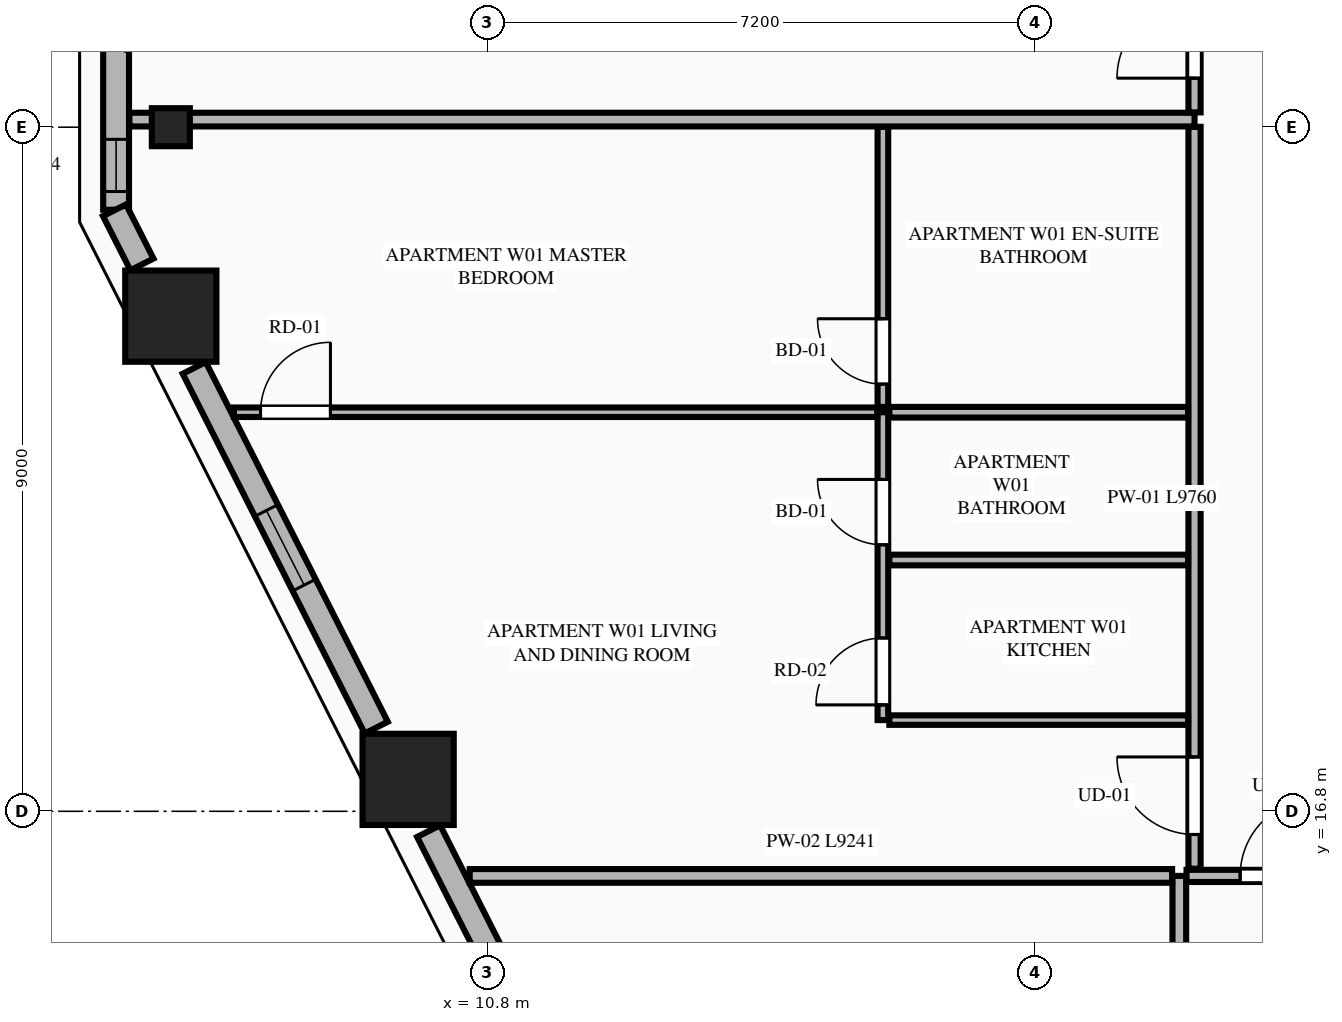
"""IFC4 building model, lengths in metres.
Left out: names, types, materials, properties, quantities, classifications, styles, units other than length and angle.
Written with IfcOpenShell. Run it as: python <this file> out.ifc"""

import sys

from ifc_helpers import new_model, si_unit, direction, frame, frame_2d, origin, origin_2d, place, context, subcontext, project, spatial, rectangle, extrude, element, fill, save


model = new_model("IFC4")
c1 = context("Model", 3, precision=1e-05, world=origin(), true_north=direction((0.0, 1.0)))
c2 = subcontext(c1, "Body", "Model", "MODEL_VIEW")
j1 = project(units=[si_unit("LENGTHUNIT", "METRE"), si_unit("PLANEANGLEUNIT", "RADIAN")], contexts=[c1])
p1 = place(None, origin())
s1 = spatial("IfcSite", under=j1, at=p1, CompositionType="ELEMENT")
p2 = place(p1, origin())
s2 = spatial("IfcBuilding", under=s1, at=p2, CompositionType="ELEMENT")
p3 = place(p2, frame((0.0, 0.0, 32.0)))
s3 = spatial("IfcBuildingStorey", under=s2, at=p3, CompositionType="ELEMENT", Elevation=32.0)
for number, where, z_axis, x_axis in (
    (1, (6.632, 23.314, 0.0), (0.0, 0.0, 1.0), (1.0, 0.0, 0.0)),
    (2, (9.754, 17.22, 0.0), (0.0, 0.0, 1.0), (1.0, 0.0, 0.0)),
):
    element("IfcColumn", number, at=place(p3, frame(where, z_axis=z_axis, x_axis=x_axis)), inside=s3, PredefinedType="COLUMN", context=c2, shape_type="SweptSolid", body=[
        extrude(rectangle(XDim=1.2, YDim=1.2, at=origin_2d()), origin(), (0.0, 0.0, 1.0), 3.55),
    ])
p4 = place(p3, frame((6.632, 25.8, 0.0), z_axis=(0.0, 0.0, 1.0), x_axis=(0.0, -1.0, 0.0)))
e3 = element("IfcColumn", 3, at=p4, inside=s3, PredefinedType="PILASTER", context=c2, shape_type="SweptSolid", body=[
    extrude(rectangle(XDim=0.5, YDim=0.35, at=origin_2d()), origin(), (0.0, 0.0, 1.0), 3.55),
])
p5 = place(p3, frame((5.912, 26.886, 0.0), z_axis=(0.0, 0.0, 1.0), x_axis=(0.0, -1.0, 0.0)))
e4 = element("IfcWall", 4, at=p5, inside=s3, PredefinedType="STANDARD", context=c2, shape_type="SweptSolid", body=[
    extrude(rectangle(XDim=2.172, YDim=0.34, at=frame_2d((1.086, 0.0))), origin(), (0.0, 0.0, 1.0), 3.33),
])
p6 = place(p5, frame((1.246, 0.0, 0.75)))
e5 = element("IfcOpeningElement", 5, at=p6, cuts=e4, PredefinedType="OPENING", context=c2, shape_type="SweptSolid", body=[
    extrude(rectangle(XDim=0.686, YDim=2.0, at=frame_2d((0.343, 1.0))), frame((0.0, 0.18, 0.0), z_axis=(0.0, -1.0, 0.0), x_axis=(1.0, 0.0, 0.0)), (0.0, 0.0, 1.0), 0.36),
])
p7 = place(p3, frame((5.891, 24.707, 0.0), z_axis=(0.0, 0.0, 1.0), x_axis=(0.452101093511, -0.891966704113, 0.0)))
e6 = element("IfcWall", 6, at=p7, inside=s3, PredefinedType="STANDARD", context=c2, shape_type="SweptSolid", body=[
    extrude(rectangle(XDim=0.798, YDim=0.34, at=frame_2d((0.399, 0.0))), origin(), (0.0, 0.0, 1.0), 3.33),
])
p8 = place(p3, frame((6.94, 22.633, 0.0), z_axis=(0.0, 0.0, 1.0), x_axis=(0.451572088722, -0.892234637686, 0.0)))
e7 = element("IfcWall", 7, at=p8, inside=s3, PredefinedType="STANDARD", context=c2, shape_type="SweptSolid", body=[
    extrude(rectangle(XDim=5.304, YDim=0.34, at=frame_2d((2.652, 0.0))), origin(), (0.0, 0.0, 1.0), 2.787),
])
p9 = place(p8, frame((2.102, 0.0, 0.75)))
e8 = element("IfcOpeningElement", 8, at=p9, cuts=e7, PredefinedType="OPENING", context=c2, shape_type="SweptSolid", body=[
    extrude(rectangle(XDim=1.1, YDim=1.887, at=frame_2d((0.55, 0.943))), frame((0.0, 0.18, 0.0), z_axis=(0.0, -1.0, 0.0), x_axis=(1.0, 0.0, 0.0)), (0.0, 0.0, 1.0), 0.36),
])
p10 = place(p3, frame((10.024, 16.539, 0.0), z_axis=(0.0, 0.0, 1.0), x_axis=(0.451627137896, -0.892206774417, 0.0)))
e9 = element("IfcWall", 9, at=p10, inside=s3, PredefinedType="STANDARD", context=c2, shape_type="SweptSolid", body=[
    extrude(rectangle(XDim=5.547, YDim=0.34, at=frame_2d((2.773, 0.0))), origin(), (0.0, 0.0, 1.0), 2.787),
])
p11 = place(p10, frame((2.223, 0.0, 0.75)))
e10 = element("IfcOpeningElement", 10, at=p11, cuts=e9, PredefinedType="OPENING", context=c2, shape_type="SweptSolid", body=[
    extrude(rectangle(XDim=1.1, YDim=1.887, at=frame_2d((0.55, 0.943))), frame((0.0, 0.18, 0.0), z_axis=(0.0, -1.0, 0.0), x_axis=(1.0, 0.0, 0.0)), (0.0, 0.0, 1.0), 0.36),
])
p12 = place(p3, frame((19.9, 2.455, 0.0), z_axis=(0.0, 0.0, 1.0), x_axis=(0.0, 1.0, 0.0)))
e11 = element("IfcWall", 11, at=p12, inside=s3, PredefinedType="PARTITIONING", context=c2, shape_type="SweptSolid", body=[
    extrude(rectangle(XDim=13.495, YDim=0.18, at=frame_2d((6.748, 0.0))), origin(), (0.0, 0.0, 1.0), 3.33),
])
p13 = place(p3, frame((19.995, 15.95, 0.0), z_axis=(0.0, 0.0, 1.0), x_axis=(1.0, 0.0, 0.0)))
e12 = element("IfcWall", 12, at=p13, inside=s3, PredefinedType="PARTITIONING", context=c2, shape_type="SweptSolid", body=[
    extrude(rectangle(XDim=8.188, YDim=0.16, at=frame_2d((4.094, 0.0))), origin(), (0.0, 0.0, 1.0), 3.33),
])
p14 = place(p13, frame((0.705, 0.0, 0.0)))
e13 = element("IfcOpeningElement", 13, at=p14, cuts=e12, PredefinedType="OPENING", context=c2, shape_type="SweptSolid", body=[
    extrude(rectangle(XDim=1.02, YDim=2.25, at=frame_2d((0.51, 1.125))), frame((0.0, 0.09, 0.0), z_axis=(0.0, -1.0, 0.0), x_axis=(1.0, 0.0, 0.0)), (0.0, 0.0, 1.0), 0.18),
])
p15 = place(p3, frame((10.564, 15.95, 0.0), z_axis=(0.0, 0.0, 1.0), x_axis=(1.0, 0.0, 0.0)))
e14 = element("IfcWall", 14, at=p15, inside=s3, PredefinedType="PARTITIONING", context=c2, shape_type="SweptSolid", body=[
    extrude(rectangle(XDim=9.241, YDim=0.18, at=frame_2d((4.621, 0.0))), origin(), (0.0, 0.0, 1.0), 3.33),
])
p16 = place(p3, frame((20.1, 16.045, 0.0), z_axis=(0.0, 0.0, 1.0), x_axis=(0.0, 1.0, 0.0)))
e15 = element("IfcWall", 15, at=p16, inside=s3, PredefinedType="PARTITIONING", context=c2, shape_type="SweptSolid", body=[
    extrude(rectangle(XDim=9.76, YDim=0.16, at=frame_2d((4.88, 0.0))), origin(), (0.0, 0.0, 1.0), 3.33),
])
p17 = place(p16, frame((0.45, 0.0, 0.0)))
e16 = element("IfcOpeningElement", 16, at=p17, cuts=e15, PredefinedType="OPENING", context=c2, shape_type="SweptSolid", body=[
    extrude(rectangle(XDim=1.02, YDim=2.25, at=frame_2d((0.51, 1.125))), frame((0.0, 0.09, 0.0), z_axis=(0.0, -1.0, 0.0), x_axis=(1.0, 0.0, 0.0)), (0.0, 0.0, 1.0), 0.18),
])
p18 = place(p3, frame((16.085, 18.0, 0.0), z_axis=(0.0, 0.0, 1.0), x_axis=(1.0, 0.0, 0.0)))
e17 = element("IfcWall", 17, at=p18, inside=s3, PredefinedType="PARTITIONING", context=c2, shape_type="SweptSolid", body=[
    extrude(rectangle(XDim=3.93, YDim=0.125, at=frame_2d((1.965, 0.0))), origin(), (0.0, 0.0, 1.0), 2.636),
])
p19 = place(p3, frame((16.0, 18.0, 0.0), z_axis=(0.0, 0.0, 1.0), x_axis=(0.0, 1.0, 0.0)))
e18 = element("IfcWall", 18, at=p19, inside=s3, PredefinedType="PLUMBINGWALL", context=c2, shape_type="SweptSolid", body=[
    extrude(rectangle(XDim=4.05, YDim=0.14, at=frame_2d((2.025, 0.0))), origin(), (0.0, 0.0, 1.0), 3.33),
])
p20 = place(p19, frame((0.2, 0.0, 0.0)))
e19 = element("IfcOpeningElement", 19, at=p20, cuts=e18, PredefinedType="OPENING", context=c2, shape_type="SweptSolid", body=[
    extrude(rectangle(XDim=0.88, YDim=2.15, at=frame_2d((0.44, 1.075))), frame((0.0, 0.08, 0.0), z_axis=(0.0, -1.0, 0.0), x_axis=(1.0, 0.0, 0.0)), (0.0, 0.0, 1.0), 0.16),
])
p21 = place(p19, frame((2.306, 0.0, 0.0)))
e20 = element("IfcOpeningElement", 20, at=p21, cuts=e18, PredefinedType="OPENING", context=c2, shape_type="SweptSolid", body=[
    extrude(rectangle(XDim=0.86, YDim=2.1, at=frame_2d((0.43, 1.05))), frame((0.0, 0.08, 0.0), z_axis=(0.0, -1.0, 0.0), x_axis=(1.0, 0.0, 0.0)), (0.0, 0.0, 1.0), 0.16),
])
p22 = place(p3, frame((16.0, 22.12, 0.0), z_axis=(0.0, 0.0, 1.0), x_axis=(0.0, 1.0, 0.0)))
e21 = element("IfcWall", 21, at=p22, inside=s3, PredefinedType="PLUMBINGWALL", context=c2, shape_type="SweptSolid", body=[
    extrude(rectangle(XDim=3.685, YDim=0.14, at=frame_2d((1.842, 0.0))), origin(), (0.0, 0.0, 1.0), 3.33),
])
p23 = place(p22, frame((0.3, 0.0, 0.0)))
e22 = element("IfcOpeningElement", 22, at=p23, cuts=e21, PredefinedType="OPENING", context=c2, shape_type="SweptSolid", body=[
    extrude(rectangle(XDim=0.86, YDim=2.1, at=frame_2d((0.43, 1.05))), frame((0.0, 0.08, 0.0), z_axis=(0.0, -1.0, 0.0), x_axis=(1.0, 0.0, 0.0)), (0.0, 0.0, 1.0), 0.16),
])
p24 = place(p3, frame((16.085, 22.05, 0.0), z_axis=(0.0, 0.0, 1.0), x_axis=(1.0, 0.0, 0.0)))
e23 = element("IfcWall", 23, at=p24, inside=s3, PredefinedType="PLUMBINGWALL", context=c2, shape_type="SweptSolid", body=[
    extrude(rectangle(XDim=3.93, YDim=0.14, at=frame_2d((1.965, 0.0))), origin(), (0.0, 0.0, 1.0), 3.33),
])
p25 = place(p3, frame((7.462, 22.05, 0.0), z_axis=(0.0, 0.0, 1.0), x_axis=(1.0, 0.0, 0.0)))
e24 = element("IfcWall", 24, at=p25, inside=s3, PredefinedType="PARTITIONING", context=c2, shape_type="SweptSolid", body=[
    extrude(rectangle(XDim=8.463, YDim=0.125, at=frame_2d((4.231, 0.0))), origin(), (0.0, 0.0, 1.0), 3.33),
])
p26 = place(p25, frame((0.35, 0.0, 0.0)))
e25 = element("IfcOpeningElement", 25, at=p26, cuts=e24, PredefinedType="OPENING", context=c2, shape_type="SweptSolid", body=[
    extrude(rectangle(XDim=0.92, YDim=2.15, at=frame_2d((0.46, 1.075))), frame((0.0, 0.073, 0.0), z_axis=(0.0, -1.0, 0.0), x_axis=(1.0, 0.0, 0.0)), (0.0, 0.0, 1.0), 0.145),
])
p27 = place(p3, frame((16.085, 20.106, 0.0), z_axis=(0.0, 0.0, 1.0), x_axis=(1.0, 0.0, 0.0)))
e26 = element("IfcWall", 26, at=p27, inside=s3, PredefinedType="PLUMBINGWALL", context=c2, shape_type="SweptSolid", body=[
    extrude(rectangle(XDim=3.93, YDim=0.14, at=frame_2d((1.965, 0.0))), origin(), (0.0, 0.0, 1.0), 3.33),
])
p28 = place(p3, frame((6.087, 25.9, 0.0), z_axis=(0.0, 0.0, 1.0), x_axis=(1.0, 0.0, 0.0)))
e27 = element("IfcWall", 27, at=p28, inside=s3, PredefinedType="PARTITIONING", context=c2, shape_type="SweptSolid", body=[
    extrude(rectangle(XDim=14.013, YDim=0.18, at=frame_2d((7.007, 0.0))), origin(), (0.0, 0.0, 1.0), 3.33),
])
p29 = place(p3, frame((20.1, 25.995, 0.0), z_axis=(0.0, 0.0, 1.0), x_axis=(0.0, 1.0, 0.0)))
e28 = element("IfcWall", 28, at=p29, inside=s3, PredefinedType="PARTITIONING", context=c2, shape_type="SweptSolid", body=[
    extrude(rectangle(XDim=9.76, YDim=0.16, at=frame_2d((4.88, 0.0))), origin(), (0.0, 0.0, 1.0), 3.33),
])
p30 = place(p29, frame((0.45, 0.0, 0.0)))
e29 = element("IfcOpeningElement", 29, at=p30, cuts=e28, PredefinedType="OPENING", context=c2, shape_type="SweptSolid", body=[
    extrude(rectangle(XDim=1.02, YDim=2.25, at=frame_2d((0.51, 1.125))), frame((0.0, 0.09, 0.0), z_axis=(0.0, -1.0, 0.0), x_axis=(1.0, 0.0, 0.0)), (0.0, 0.0, 1.0), 0.18),
])
p31 = place(p9, origin())
e30 = element("IfcWindow", 30, at=p31, inside=s3, PartitioningType="SINGLE_PANEL", PredefinedType="WINDOW", context=c2, shape_type="SweptSolid", body=[
    extrude(rectangle(XDim=1.1, YDim=1.887, at=frame_2d((0.55, 0.943))), frame((0.0, 0.03, 0.0), z_axis=(0.0, -1.0, 0.0), x_axis=(1.0, 0.0, 0.0)), (0.0, 0.0, 1.0), 0.06),
])
fill(e8, e30)
p32 = place(p14, origin())
e31 = element("IfcDoor", 31, at=p32, inside=s3, OperationType="SINGLE_SWING_RIGHT", PredefinedType="DOOR", context=c2, shape_type="SweptSolid", body=[
    extrude(rectangle(XDim=1.02, YDim=2.25, at=frame_2d((0.51, 1.125))), frame((0.0, 0.025, 0.0), z_axis=(0.0, -1.0, 0.0), x_axis=(1.0, 0.0, 0.0)), (0.0, 0.0, 1.0), 0.05),
])
fill(e13, e31)
p33 = place(p20, origin())
e32 = element("IfcDoor", 32, at=p33, inside=s3, OperationType="SINGLE_SWING_LEFT", PredefinedType="DOOR", context=c2, shape_type="SweptSolid", body=[
    extrude(rectangle(XDim=0.88, YDim=2.15, at=frame_2d((0.44, 1.075))), frame((0.0, 0.025, 0.0), z_axis=(0.0, -1.0, 0.0), x_axis=(1.0, 0.0, 0.0)), (0.0, 0.0, 1.0), 0.05),
])
fill(e19, e32)
p34 = place(p21, origin())
e33 = element("IfcDoor", 33, at=p34, inside=s3, OperationType="SINGLE_SWING_RIGHT", PredefinedType="DOOR", context=c2, shape_type="SweptSolid", body=[
    extrude(rectangle(XDim=0.86, YDim=2.1, at=frame_2d((0.43, 1.05))), frame((0.0, 0.025, 0.0), z_axis=(0.0, -1.0, 0.0), x_axis=(1.0, 0.0, 0.0)), (0.0, 0.0, 1.0), 0.05),
])
fill(e20, e33)
p35 = place(p23, origin())
e34 = element("IfcDoor", 34, at=p35, inside=s3, OperationType="SINGLE_SWING_RIGHT", PredefinedType="DOOR", context=c2, shape_type="SweptSolid", body=[
    extrude(rectangle(XDim=0.86, YDim=2.1, at=frame_2d((0.43, 1.05))), frame((0.0, 0.025, 0.0), z_axis=(0.0, -1.0, 0.0), x_axis=(1.0, 0.0, 0.0)), (0.0, 0.0, 1.0), 0.05),
])
fill(e22, e34)
p36 = place(p17, origin())
e35 = element("IfcDoor", 35, at=p36, inside=s3, OperationType="SINGLE_SWING_RIGHT", PredefinedType="DOOR", context=c2, shape_type="SweptSolid", body=[
    extrude(rectangle(XDim=1.02, YDim=2.25, at=frame_2d((0.51, 1.125))), frame((0.0, 0.025, 0.0), z_axis=(0.0, -1.0, 0.0), x_axis=(1.0, 0.0, 0.0)), (0.0, 0.0, 1.0), 0.05),
])
fill(e16, e35)
p37 = place(p26, origin())
e36 = element("IfcDoor", 36, at=p37, inside=s3, OperationType="SINGLE_SWING_RIGHT", PredefinedType="DOOR", context=c2, shape_type="SweptSolid", body=[
    extrude(rectangle(XDim=0.92, YDim=2.15, at=frame_2d((0.46, 1.075))), frame((0.0, 0.025, 0.0), z_axis=(0.0, -1.0, 0.0), x_axis=(1.0, 0.0, 0.0)), (0.0, 0.0, 1.0), 0.05),
])
fill(e25, e36)
p38 = place(p30, origin())
e37 = element("IfcDoor", 37, at=p38, inside=s3, OperationType="SINGLE_SWING_LEFT", PredefinedType="DOOR", context=c2, shape_type="SweptSolid", body=[
    extrude(rectangle(XDim=1.02, YDim=2.25, at=frame_2d((0.51, 1.125))), frame((0.0, 0.025, 0.0), z_axis=(0.0, -1.0, 0.0), x_axis=(1.0, 0.0, 0.0)), (0.0, 0.0, 1.0), 0.05),
])
fill(e29, e37)
p39 = place(p6, origin())
e38 = element("IfcWindow", 38, at=p39, inside=s3, PartitioningType="SINGLE_PANEL", PredefinedType="WINDOW", context=c2, shape_type="SweptSolid", body=[
    extrude(rectangle(XDim=0.686, YDim=2.0, at=frame_2d((0.343, 1.0))), frame((0.0, 0.03, 0.0), z_axis=(0.0, -1.0, 0.0), x_axis=(1.0, 0.0, 0.0)), (0.0, 0.0, 1.0), 0.06),
])
fill(e5, e38)
save(model, sys.argv[1])
